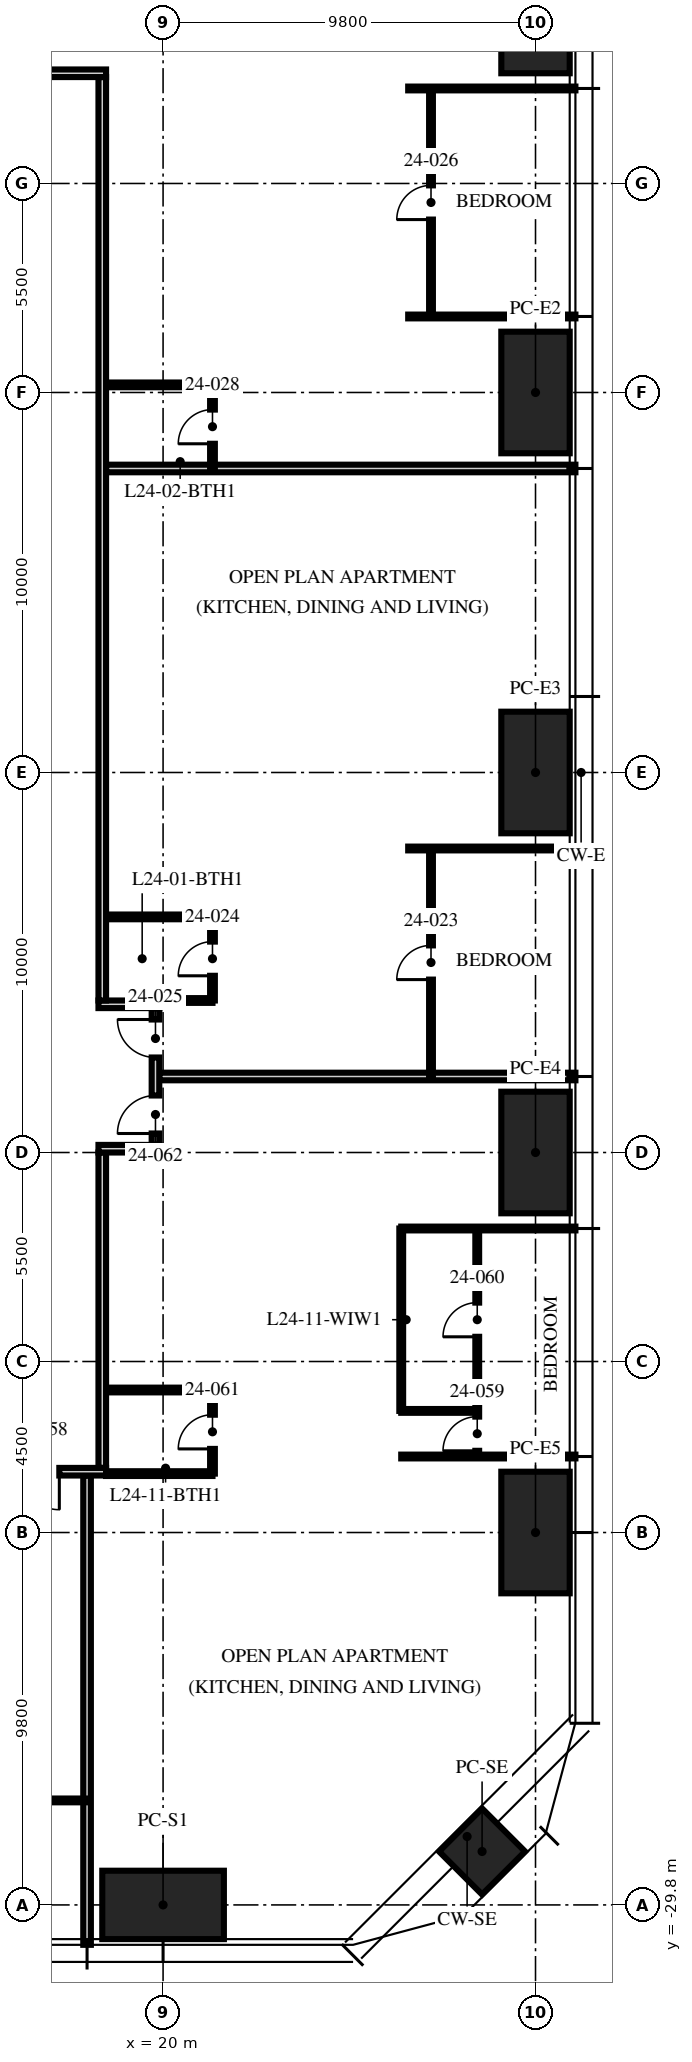
"""IFC4 building model, lengths in metres.
Left out: names, types, materials, properties, quantities, classifications, styles, units other than length and angle.
Written with IfcOpenShell. Run it as: python <this file> out.ifc"""

import sys

from ifc_helpers import new_model, si_unit, direction, frame, frame_2d, origin, origin_2d, place, context, subcontext, project, spatial, rectangle, hollow_rectangle, extrude, element, fill, save


model = new_model("IFC4")
c1 = context("Model", 3, precision=1e-05, world=origin(), true_north=direction((0.0, 1.0)))
c2 = subcontext(c1, "Body", "Model", "MODEL_VIEW")
j1 = project(units=[si_unit("LENGTHUNIT", "METRE"), si_unit("PLANEANGLEUNIT", "RADIAN")], contexts=[c1])
p1 = place(None, origin())
s1 = spatial("IfcSite", under=j1, at=p1, CompositionType="ELEMENT")
p2 = place(p1, origin())
s2 = spatial("IfcBuilding", under=s1, at=p2, CompositionType="ELEMENT")
p3 = place(p2, frame((0.0, 0.0, 96.0)))
s3 = spatial("IfcBuildingStorey", under=s2, at=p3, CompositionType="ELEMENT", Elevation=96.0)
p4 = place(p3, frame((29.8, 20.0, 0.0), z_axis=(0.0, 0.0, 1.0), x_axis=(0.0, 1.0, 0.0)))
e1 = element("IfcColumn", 1, at=p4, inside=s3, PredefinedType="COLUMN", context=c2, shape_type="SweptSolid", body=[
    extrude(hollow_rectangle(XDim=3.2, YDim=1.8, WallThickness=0.2, at=origin_2d()), origin(), (0.0, 0.0, 1.0), 2.47),
])
p5 = place(p3, frame((29.8, 10.0, 0.0), z_axis=(0.0, 0.0, 1.0), x_axis=(0.0, 1.0, 0.0)))
e2 = element("IfcColumn", 2, at=p5, inside=s3, PredefinedType="COLUMN", context=c2, shape_type="SweptSolid", body=[
    extrude(hollow_rectangle(XDim=3.2, YDim=1.8, WallThickness=0.2, at=origin_2d()), origin(), (0.0, 0.0, 1.0), 2.62),
])
p6 = place(p3, frame((29.8, 0.0, 0.0), z_axis=(0.0, 0.0, 1.0), x_axis=(0.0, 1.0, 0.0)))
e3 = element("IfcColumn", 3, at=p6, inside=s3, PredefinedType="COLUMN", context=c2, shape_type="SweptSolid", body=[
    extrude(hollow_rectangle(XDim=3.2, YDim=1.8, WallThickness=0.2, at=origin_2d()), origin(), (0.0, 0.0, 1.0), 2.78),
])
p7 = place(p3, frame((29.8, -10.0, 0.0), z_axis=(0.0, 0.0, 1.0), x_axis=(0.0, 1.0, 0.0)))
e4 = element("IfcColumn", 4, at=p7, inside=s3, PredefinedType="COLUMN", context=c2, shape_type="SweptSolid", body=[
    extrude(hollow_rectangle(XDim=3.2, YDim=1.8, WallThickness=0.2, at=origin_2d()), origin(), (0.0, 0.0, 1.0), 2.62),
])
for number, where, z_axis, x_axis in (
    (5, (29.8, -20.0, 0.0), (0.0, 0.0, 1.0), (0.0, 1.0, 0.0)),
    (6, (20.0, -29.8, 0.0), (0.0, 0.0, 1.0), (1.0, 0.0, 0.0)),
):
    element("IfcColumn", number, at=place(p3, frame(where, z_axis=z_axis, x_axis=x_axis)), inside=s3, PredefinedType="COLUMN", context=c2, shape_type="SweptSolid", body=[
        extrude(hollow_rectangle(XDim=3.2, YDim=1.8, WallThickness=0.2, at=origin_2d()), origin(), (0.0, 0.0, 1.0), 2.47),
    ])
p8 = place(p3, frame((28.394, -28.394, 0.0), z_axis=(0.0, 0.0, 1.0), x_axis=(0.707106781187, 0.707106781187, 0.0)))
e7 = element("IfcColumn", 7, at=p8, inside=s3, PredefinedType="COLUMN", context=c2, shape_type="SweptSolid", body=[
    extrude(hollow_rectangle(XDim=1.6, YDim=1.6, WallThickness=0.1, at=origin_2d()), origin(), (0.0, 0.0, 1.0), 2.74),
])
p9 = place(p3, frame((19.9, -8.0, 0.0), z_axis=(0.0, 0.0, 1.0), x_axis=(1.0, 0.0, 0.0)))
e8 = element("IfcWall", 8, at=p9, inside=s3, PredefinedType="PARTITIONING", context=c2, shape_type="SweptSolid", body=[
    extrude(rectangle(XDim=10.95, YDim=0.2, at=frame_2d((5.475, 0.0))), origin(), (0.0, 0.0, 1.0), 2.7),
])
p10 = place(p3, frame((26.45, -2.0, 0.0), z_axis=(0.0, 0.0, 1.0), x_axis=(1.0, 0.0, 0.0)))
e9 = element("IfcWall", 9, at=p10, inside=s3, PredefinedType="PARTITIONING", context=c2, shape_type="SweptSolid", body=[
    extrude(rectangle(XDim=4.4, YDim=0.1, at=frame_2d((2.2, 0.0))), origin(), (0.0, 0.0, 1.0), 2.7),
])
p11 = place(p3, frame((18.5, 8.0, 0.0), z_axis=(0.0, 0.0, 1.0), x_axis=(1.0, 0.0, 0.0)))
e10 = element("IfcWall", 10, at=p11, inside=s3, PredefinedType="PARTITIONING", context=c2, shape_type="SweptSolid", body=[
    extrude(rectangle(XDim=12.35, YDim=0.2, at=frame_2d((6.175, 0.0))), origin(), (0.0, 0.0, 1.0), 2.7),
])
for number, where, z_axis, x_axis in (
    (11, (26.45, 12.0, 0.0), (0.0, 0.0, 1.0), (1.0, 0.0, 0.0)),
    (12, (26.45, 18.0, 0.0), (0.0, 0.0, 1.0), (1.0, 0.0, 0.0)),
):
    element("IfcWall", number, at=place(p3, frame(where, z_axis=z_axis, x_axis=x_axis)), inside=s3, PredefinedType="PARTITIONING", context=c2, shape_type="SweptSolid", body=[
        extrude(rectangle(XDim=4.4, YDim=0.1, at=frame_2d((2.2, 0.0))), origin(), (0.0, 0.0, 1.0), 2.7),
    ])
p12 = place(p3, frame((18.0, -18.5, 0.0), z_axis=(0.0, 0.0, 1.0), x_axis=(0.0, -1.0, 0.0)))
e13 = element("IfcWall", 13, at=p12, inside=s3, PredefinedType="PARTITIONING", context=c2, shape_type="SweptSolid", body=[
    extrude(rectangle(XDim=12.35, YDim=0.2, at=frame_2d((6.175, 0.0))), origin(), (0.0, 0.0, 1.0), 2.3),
])
for number, where, z_axis, x_axis in (
    (14, (26.267, -18.0, 0.0), (0.0, 0.0, 1.0), (1.0, 0.0, 0.0)),
    (15, (26.267, -12.0, 0.0), (0.0, 0.0, 1.0), (1.0, 0.0, 0.0)),
):
    element("IfcWall", number, at=place(p3, frame(where, z_axis=z_axis, x_axis=x_axis)), inside=s3, PredefinedType="PARTITIONING", context=c2, shape_type="SweptSolid", body=[
        extrude(rectangle(XDim=4.583, YDim=0.1, at=frame_2d((2.292, 0.0))), origin(), (0.0, 0.0, 1.0), 2.7),
    ])
p13 = place(p3, frame((27.05, -8.0, 0.0), z_axis=(0.0, 0.0, 1.0), x_axis=(0.0, 1.0, 0.0)))
e16 = element("IfcWall", 16, at=p13, inside=s3, PredefinedType="PARTITIONING", context=c2, shape_type="SweptSolid", body=[
    extrude(rectangle(XDim=6.0, YDim=0.1, at=frame_2d((3.0, 0.0))), origin(), (0.0, 0.0, 1.0), 2.2),
])
p14 = place(p13, frame((2.55, 0.0, 0.0)))
e17 = element("IfcOpeningElement", 17, at=p14, cuts=e16, PredefinedType="OPENING", context=c2, shape_type="SweptSolid", body=[
    extrude(rectangle(XDim=0.9, YDim=2.1, at=frame_2d((0.45, 1.05))), frame((0.0, 0.06, 0.0), z_axis=(0.0, -1.0, 0.0), x_axis=(1.0, 0.0, 0.0)), (0.0, 0.0, 1.0), 0.12),
])
p15 = place(p3, frame((21.3, -6.0, 0.0), z_axis=(0.0, 0.0, 1.0), x_axis=(0.0, 1.0, 0.0)))
e18 = element("IfcWall", 18, at=p15, inside=s3, PredefinedType="PARTITIONING", context=c2, shape_type="SweptSolid", body=[
    extrude(rectangle(XDim=2.2, YDim=0.125, at=frame_2d((1.1, 0.0))), origin(), (0.0, 0.0, 1.0), 2.2),
])
p16 = place(p15, frame((0.65, 0.0, 0.0)))
e19 = element("IfcOpeningElement", 19, at=p16, cuts=e18, PredefinedType="OPENING", context=c2, shape_type="SweptSolid", body=[
    extrude(rectangle(XDim=0.9, YDim=2.1, at=frame_2d((0.45, 1.05))), frame((0.0, 0.073, 0.0), z_axis=(0.0, -1.0, 0.0), x_axis=(1.0, 0.0, 0.0)), (0.0, 0.0, 1.0), 0.145),
])
p17 = place(p3, frame((19.97, -6.0, 0.0), z_axis=(0.0, 0.0, 1.0), x_axis=(1.0, 0.0, 0.0)))
e20 = element("IfcWall", 20, at=p17, inside=s3, PredefinedType="PARTITIONING", context=c2, shape_type="SweptSolid", body=[
    extrude(rectangle(XDim=1.33, YDim=0.125, at=frame_2d((0.665, 0.0))), origin(), (0.0, 0.0, 1.0), 3.4),
])
p18 = place(p3, frame((18.5, -3.8, 0.0), z_axis=(0.0, 0.0, 1.0), x_axis=(1.0, 0.0, 0.0)))
e21 = element("IfcWall", 21, at=p18, inside=s3, PredefinedType="PARTITIONING", context=c2, shape_type="SweptSolid", body=[
    extrude(rectangle(XDim=2.8, YDim=0.125, at=frame_2d((1.4, 0.0))), origin(), (0.0, 0.0, 1.0), 3.4),
])
p19 = place(p3, frame((27.05, 12.0, 0.0), z_axis=(0.0, 0.0, 1.0), x_axis=(0.0, 1.0, 0.0)))
e22 = element("IfcWall", 22, at=p19, inside=s3, PredefinedType="PARTITIONING", context=c2, shape_type="SweptSolid", body=[
    extrude(rectangle(XDim=6.0, YDim=0.1, at=frame_2d((3.0, 0.0))), origin(), (0.0, 0.0, 1.0), 2.2),
])
p20 = place(p19, frame((2.55, 0.0, 0.0)))
e23 = element("IfcOpeningElement", 23, at=p20, cuts=e22, PredefinedType="OPENING", context=c2, shape_type="SweptSolid", body=[
    extrude(rectangle(XDim=0.9, YDim=2.1, at=frame_2d((0.45, 1.05))), frame((0.0, 0.06, 0.0), z_axis=(0.0, -1.0, 0.0), x_axis=(1.0, 0.0, 0.0)), (0.0, 0.0, 1.0), 0.12),
])
p21 = place(p3, frame((21.3, 8.0, 0.0), z_axis=(0.0, 0.0, 1.0), x_axis=(0.0, 1.0, 0.0)))
e24 = element("IfcWall", 24, at=p21, inside=s3, PredefinedType="PARTITIONING", context=c2, shape_type="SweptSolid", body=[
    extrude(rectangle(XDim=2.2, YDim=0.125, at=frame_2d((1.1, 0.0))), origin(), (0.0, 0.0, 1.0), 2.3),
])
p22 = place(p21, frame((0.65, 0.0, 0.0)))
e25 = element("IfcOpeningElement", 25, at=p22, cuts=e24, PredefinedType="OPENING", context=c2, shape_type="SweptSolid", body=[
    extrude(rectangle(XDim=0.9, YDim=2.1, at=frame_2d((0.45, 1.05))), frame((0.0, 0.073, 0.0), z_axis=(0.0, -1.0, 0.0), x_axis=(1.0, 0.0, 0.0)), (0.0, 0.0, 1.0), 0.145),
])
p23 = place(p3, frame((18.5, 10.2, 0.0), z_axis=(0.0, 0.0, 1.0), x_axis=(1.0, 0.0, 0.0)))
e26 = element("IfcWall", 26, at=p23, inside=s3, PredefinedType="PARTITIONING", context=c2, shape_type="SweptSolid", body=[
    extrude(rectangle(XDim=2.8, YDim=0.125, at=frame_2d((1.4, 0.0))), origin(), (0.0, 0.0, 1.0), 2.3),
])
p24 = place(p3, frame((12.0, -27.05, 0.0), z_axis=(0.0, 0.0, 1.0), x_axis=(1.0, 0.0, 0.0)))
e27 = element("IfcWall", 27, at=p24, inside=s3, PredefinedType="PARTITIONING", context=c2, shape_type="SweptSolid", body=[
    extrude(rectangle(XDim=6.0, YDim=0.1, at=frame_2d((3.0, 0.0))), origin(), (0.0, 0.0, 1.0), 2.2),
])
p25 = place(p24, frame((2.55, 0.0, 0.0)))
e28 = element("IfcOpeningElement", 28, at=p25, cuts=e27, PredefinedType="OPENING", context=c2, shape_type="SweptSolid", body=[
    extrude(rectangle(XDim=0.9, YDim=2.1, at=frame_2d((0.45, 1.05))), frame((0.0, 0.06, 0.0), z_axis=(0.0, -1.0, 0.0), x_axis=(1.0, 0.0, 0.0)), (0.0, 0.0, 1.0), 0.12),
])
p26 = place(p3, frame((28.267, -18.0, 0.0), z_axis=(0.0, 0.0, 1.0), x_axis=(0.0, 1.0, 0.0)))
e29 = element("IfcWall", 29, at=p26, inside=s3, PredefinedType="PARTITIONING", context=c2, shape_type="SweptSolid", body=[
    extrude(rectangle(XDim=6.0, YDim=0.1, at=frame_2d((3.0, 0.0))), origin(), (0.0, 0.0, 1.0), 2.2),
])
p27 = place(p26, frame((0.15, 0.0, 0.0)))
e30 = element("IfcOpeningElement", 30, at=p27, cuts=e29, PredefinedType="OPENING", context=c2, shape_type="SweptSolid", body=[
    extrude(rectangle(XDim=0.9, YDim=2.1, at=frame_2d((0.45, 1.05))), frame((0.0, 0.06, 0.0), z_axis=(0.0, -1.0, 0.0), x_axis=(1.0, 0.0, 0.0)), (0.0, 0.0, 1.0), 0.12),
])
p28 = place(p26, frame((3.15, 0.0, 0.0)))
e31 = element("IfcOpeningElement", 31, at=p28, cuts=e29, PredefinedType="OPENING", context=c2, shape_type="SweptSolid", body=[
    extrude(rectangle(XDim=0.9, YDim=2.1, at=frame_2d((0.45, 1.05))), frame((0.0, 0.06, 0.0), z_axis=(0.0, -1.0, 0.0), x_axis=(1.0, 0.0, 0.0)), (0.0, 0.0, 1.0), 0.12),
])
p29 = place(p3, frame((26.267, -16.8, 0.0), z_axis=(0.0, 0.0, 1.0), x_axis=(1.0, 0.0, 0.0)))
e32 = element("IfcWall", 32, at=p29, inside=s3, PredefinedType="PARTITIONING", context=c2, shape_type="SweptSolid", body=[
    extrude(rectangle(XDim=2.0, YDim=0.1, at=frame_2d((1.0, 0.0))), origin(), (0.0, 0.0, 1.0), 3.4),
])
p30 = place(p3, frame((26.267, -16.8, 0.0), z_axis=(0.0, 0.0, 1.0), x_axis=(0.0, 1.0, 0.0)))
e33 = element("IfcWall", 33, at=p30, inside=s3, PredefinedType="PARTITIONING", context=c2, shape_type="SweptSolid", body=[
    extrude(rectangle(XDim=4.8, YDim=0.1, at=frame_2d((2.4, 0.0))), origin(), (0.0, 0.0, 1.0), 2.2),
])
p31 = place(p3, frame((21.3, -18.45, 0.0), z_axis=(0.0, 0.0, 1.0), x_axis=(0.0, 1.0, 0.0)))
e34 = element("IfcWall", 34, at=p31, inside=s3, PredefinedType="PARTITIONING", context=c2, shape_type="SweptSolid", body=[
    extrude(rectangle(XDim=2.2, YDim=0.125, at=frame_2d((1.1, 0.0))), origin(), (0.0, 0.0, 1.0), 3.4),
])
p32 = place(p31, frame((0.65, 0.0, 0.0)))
e35 = element("IfcOpeningElement", 35, at=p32, cuts=e34, PredefinedType="OPENING", context=c2, shape_type="SweptSolid", body=[
    extrude(rectangle(XDim=0.9, YDim=2.1, at=frame_2d((0.45, 1.05))), frame((0.0, 0.073, 0.0), z_axis=(0.0, -1.0, 0.0), x_axis=(1.0, 0.0, 0.0)), (0.0, 0.0, 1.0), 0.145),
])
p33 = place(p3, frame((18.5, -18.45, 0.0), z_axis=(0.0, 0.0, 1.0), x_axis=(1.0, 0.0, 0.0)))
e36 = element("IfcWall", 36, at=p33, inside=s3, PredefinedType="PARTITIONING", context=c2, shape_type="SweptSolid", body=[
    extrude(rectangle(XDim=2.8, YDim=0.125, at=frame_2d((1.4, 0.0))), origin(), (0.0, 0.0, 1.0), 2.3),
])
p34 = place(p3, frame((18.5, -16.25, 0.0), z_axis=(0.0, 0.0, 1.0), x_axis=(1.0, 0.0, 0.0)))
e37 = element("IfcWall", 37, at=p34, inside=s3, PredefinedType="PARTITIONING", context=c2, shape_type="SweptSolid", body=[
    extrude(rectangle(XDim=2.8, YDim=0.125, at=frame_2d((1.4, 0.0))), origin(), (0.0, 0.0, 1.0), 3.4),
])
p35 = place(p3, frame((18.4, -18.3, 0.0), z_axis=(0.0, 0.0, 1.0), x_axis=(0.0, 1.0, 0.0)))
e38 = element("IfcWall", 38, at=p35, inside=s3, PredefinedType="PARTITIONING", context=c2, shape_type="SweptSolid", body=[
    extrude(rectangle(XDim=8.3, YDim=0.2, at=frame_2d((4.15, 0.0))), origin(), (0.0, 0.0, 1.0), 2.2),
])
p36 = place(p3, frame((18.3, -9.9, 0.0), z_axis=(0.0, 0.0, 1.0), x_axis=(1.0, 0.0, 0.0)))
e39 = element("IfcWall", 39, at=p36, inside=s3, PredefinedType="PARTITIONING", context=c2, shape_type="SweptSolid", body=[
    extrude(rectangle(XDim=1.6, YDim=0.2, at=frame_2d((0.8, 0.0))), origin(), (0.0, 0.0, 1.0), 2.3),
])
p37 = place(p3, frame((18.3, -6.1, 0.0), z_axis=(0.0, 0.0, 1.0), x_axis=(1.0, 0.0, 0.0)))
e40 = element("IfcWall", 40, at=p37, inside=s3, PredefinedType="PARTITIONING", context=c2, shape_type="SweptSolid", body=[
    extrude(rectangle(XDim=1.6, YDim=0.2, at=frame_2d((0.8, 0.0))), origin(), (0.0, 0.0, 1.0), 3.4),
])
p38 = place(p3, frame((19.8, -9.8, 0.0), z_axis=(0.0, 0.0, 1.0), x_axis=(0.0, 1.0, 0.0)))
e41 = element("IfcWall", 41, at=p38, inside=s3, PredefinedType="PARTITIONING", context=c2, shape_type="SweptSolid", body=[
    extrude(rectangle(XDim=3.6, YDim=0.2, at=frame_2d((1.8, 0.0))), origin(), (0.0, 0.0, 1.0), 2.3),
])
p39 = place(p38, frame((2.3, 0.0, 0.0)))
e42 = element("IfcOpeningElement", 42, at=p39, cuts=e41, PredefinedType="OPENING", context=c2, shape_type="SweptSolid", body=[
    extrude(rectangle(XDim=1.0, YDim=2.2, at=frame_2d((0.5, 1.1))), frame((0.0, 0.11, 0.0), z_axis=(0.0, -1.0, 0.0), x_axis=(1.0, 0.0, 0.0)), (0.0, 0.0, 1.0), 0.22),
])
p40 = place(p38, frame((0.3, 0.0, 0.0)))
e43 = element("IfcOpeningElement", 43, at=p40, cuts=e41, PredefinedType="OPENING", context=c2, shape_type="SweptSolid", body=[
    extrude(rectangle(XDim=1.0, YDim=2.2, at=frame_2d((0.5, 1.1))), frame((0.0, 0.11, 0.0), z_axis=(0.0, -1.0, 0.0), x_axis=(1.0, 0.0, 0.0)), (0.0, 0.0, 1.0), 0.22),
])
p41 = place(p3, frame((18.4, -6.0, 0.0), z_axis=(0.0, 0.0, 1.0), x_axis=(0.0, 1.0, 0.0)))
e44 = element("IfcWall", 44, at=p41, inside=s3, PredefinedType="PARTITIONING", context=c2, shape_type="SweptSolid", body=[
    extrude(rectangle(XDim=24.3, YDim=0.2, at=frame_2d((12.15, 0.0))), origin(), (0.0, 0.0, 1.0), 2.2),
])
p42 = place(p3, frame((10.0, 18.4, 0.0), z_axis=(0.0, 0.0, 1.0), x_axis=(1.0, 0.0, 0.0)))
e45 = element("IfcWall", 45, at=p42, inside=s3, PredefinedType="PARTITIONING", context=c2, shape_type="SweptSolid", body=[
    extrude(rectangle(XDim=8.5, YDim=0.2, at=frame_2d((4.25, 0.0))), origin(), (0.0, 0.0, 1.0), 2.2),
])
p43 = place(p3, frame((18.5, -18.4, 0.0), z_axis=(0.0, 0.0, 1.0), x_axis=(-1.0, 0.0, 0.0)))
e46 = element("IfcWall", 46, at=p43, inside=s3, PredefinedType="PARTITIONING", context=c2, shape_type="SweptSolid", body=[
    extrude(rectangle(XDim=24.5, YDim=0.2, at=frame_2d((12.25, 0.0))), origin(), (0.0, 0.0, 1.0), 2.2),
])
p44 = place(p43, frame((1.23, 0.0, 0.0)))
e47 = element("IfcOpeningElement", 47, at=p44, cuts=e46, PredefinedType="OPENING", context=c2, shape_type="SweptSolid", body=[
    extrude(rectangle(XDim=1.0, YDim=2.2, at=frame_2d((0.5, 1.1))), frame((0.0, 0.11, 0.0), z_axis=(0.0, -1.0, 0.0), x_axis=(1.0, 0.0, 0.0)), (0.0, 0.0, 1.0), 0.22),
])
p45 = place(p14, origin())
e48 = element("IfcDoor", 48, at=p45, inside=s3, OperationType="SINGLE_SWING_LEFT", PredefinedType="DOOR", context=c2, shape_type="SweptSolid", body=[
    extrude(rectangle(XDim=0.9, YDim=2.1, at=frame_2d((0.45, 1.05))), frame((0.0, 0.025, 0.0), z_axis=(0.0, -1.0, 0.0), x_axis=(1.0, 0.0, 0.0)), (0.0, 0.0, 1.0), 0.05),
])
fill(e17, e48)
p46 = place(p16, origin())
e49 = element("IfcDoor", 49, at=p46, inside=s3, OperationType="SINGLE_SWING_LEFT", PredefinedType="DOOR", context=c2, shape_type="SweptSolid", body=[
    extrude(rectangle(XDim=0.9, YDim=2.1, at=frame_2d((0.45, 1.05))), frame((0.0, 0.025, 0.0), z_axis=(0.0, -1.0, 0.0), x_axis=(1.0, 0.0, 0.0)), (0.0, 0.0, 1.0), 0.05),
])
fill(e19, e49)
p47 = place(p39, origin())
e50 = element("IfcDoor", 50, at=p47, inside=s3, OperationType="SINGLE_SWING_RIGHT", PredefinedType="DOOR", context=c2, shape_type="SweptSolid", body=[
    extrude(rectangle(XDim=1.0, YDim=2.2, at=frame_2d((0.5, 1.1))), frame((0.0, 0.025, 0.0), z_axis=(0.0, -1.0, 0.0), x_axis=(1.0, 0.0, 0.0)), (0.0, 0.0, 1.0), 0.05),
])
fill(e42, e50)
p48 = place(p20, origin())
e51 = element("IfcDoor", 51, at=p48, inside=s3, OperationType="SINGLE_SWING_LEFT", PredefinedType="DOOR", context=c2, shape_type="SweptSolid", body=[
    extrude(rectangle(XDim=0.9, YDim=2.1, at=frame_2d((0.45, 1.05))), frame((0.0, 0.025, 0.0), z_axis=(0.0, -1.0, 0.0), x_axis=(1.0, 0.0, 0.0)), (0.0, 0.0, 1.0), 0.05),
])
fill(e23, e51)
p49 = place(p22, origin())
e52 = element("IfcDoor", 52, at=p49, inside=s3, OperationType="SINGLE_SWING_LEFT", PredefinedType="DOOR", context=c2, shape_type="SweptSolid", body=[
    extrude(rectangle(XDim=0.9, YDim=2.1, at=frame_2d((0.45, 1.05))), frame((0.0, 0.025, 0.0), z_axis=(0.0, -1.0, 0.0), x_axis=(1.0, 0.0, 0.0)), (0.0, 0.0, 1.0), 0.05),
])
fill(e25, e52)
p50 = place(p44, origin())
e53 = element("IfcDoor", 53, at=p50, inside=s3, OperationType="SINGLE_SWING_LEFT", PredefinedType="DOOR", context=c2, shape_type="SweptSolid", body=[
    extrude(rectangle(XDim=1.0, YDim=2.2, at=frame_2d((0.5, 1.1))), frame((0.0, 0.025, 0.0), z_axis=(0.0, -1.0, 0.0), x_axis=(1.0, 0.0, 0.0)), (0.0, 0.0, 1.0), 0.05),
])
fill(e47, e53)
p51 = place(p27, origin())
e54 = element("IfcDoor", 54, at=p51, inside=s3, OperationType="SINGLE_SWING_LEFT", PredefinedType="DOOR", context=c2, shape_type="SweptSolid", body=[
    extrude(rectangle(XDim=0.9, YDim=2.1, at=frame_2d((0.45, 1.05))), frame((0.0, 0.025, 0.0), z_axis=(0.0, -1.0, 0.0), x_axis=(1.0, 0.0, 0.0)), (0.0, 0.0, 1.0), 0.05),
])
fill(e30, e54)
p52 = place(p28, origin())
e55 = element("IfcDoor", 55, at=p52, inside=s3, OperationType="SINGLE_SWING_LEFT", PredefinedType="DOOR", context=c2, shape_type="SweptSolid", body=[
    extrude(rectangle(XDim=0.9, YDim=2.1, at=frame_2d((0.45, 1.05))), frame((0.0, 0.025, 0.0), z_axis=(0.0, -1.0, 0.0), x_axis=(1.0, 0.0, 0.0)), (0.0, 0.0, 1.0), 0.05),
])
fill(e31, e55)
p53 = place(p32, origin())
e56 = element("IfcDoor", 56, at=p53, inside=s3, OperationType="SINGLE_SWING_LEFT", PredefinedType="DOOR", context=c2, shape_type="SweptSolid", body=[
    extrude(rectangle(XDim=0.9, YDim=2.1, at=frame_2d((0.45, 1.05))), frame((0.0, 0.025, 0.0), z_axis=(0.0, -1.0, 0.0), x_axis=(1.0, 0.0, 0.0)), (0.0, 0.0, 1.0), 0.05),
])
fill(e35, e56)
p54 = place(p40, origin())
e57 = element("IfcDoor", 57, at=p54, inside=s3, OperationType="SINGLE_SWING_LEFT", PredefinedType="DOOR", context=c2, shape_type="SweptSolid", body=[
    extrude(rectangle(XDim=1.0, YDim=2.2, at=frame_2d((0.5, 1.1))), frame((0.0, 0.025, 0.0), z_axis=(0.0, -1.0, 0.0), x_axis=(1.0, 0.0, 0.0)), (0.0, 0.0, 1.0), 0.05),
])
fill(e43, e57)
save(model, sys.argv[1])
